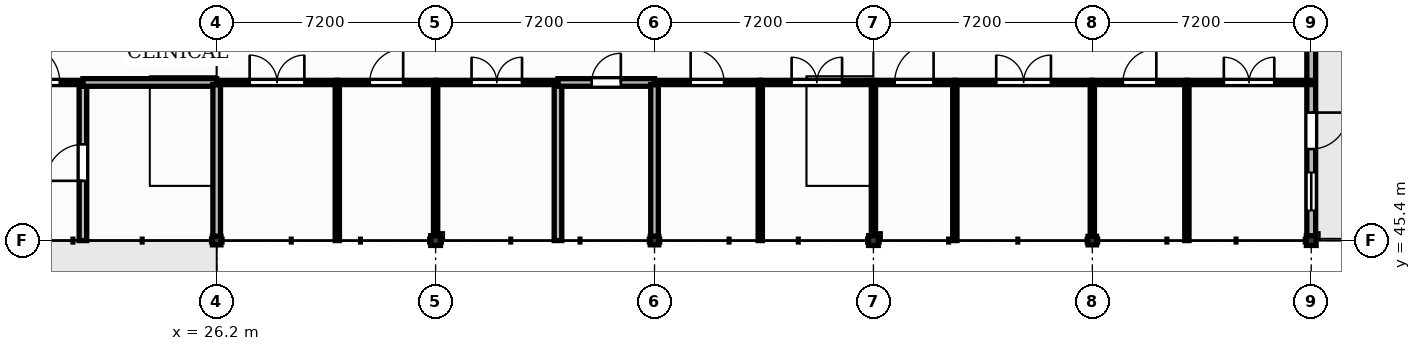
"""IFC4 building model, lengths in metres.
Left out: names, types, materials, properties, quantities, classifications, styles, units other than length and angle.
Written with IfcOpenShell. Run it as: python <this file> out.ifc"""

import sys

from ifc_helpers import new_model, si_unit, direction, frame, frame_2d, origin, origin_2d, place, context, subcontext, project, spatial, rectangle, extrude, element, fill, save


model = new_model("IFC4")
c1 = context("Model", 3, precision=1e-05, world=origin(), true_north=direction((0.0, 1.0)))
c2 = subcontext(c1, "Body", "Model", "MODEL_VIEW")
j1 = project(units=[si_unit("LENGTHUNIT", "METRE"), si_unit("PLANEANGLEUNIT", "RADIAN")], contexts=[c1])
p1 = place(None, origin())
s1 = spatial("IfcSite", under=j1, at=p1, CompositionType="ELEMENT")
p2 = place(p1, origin())
s2 = spatial("IfcBuilding", under=s1, at=p2, CompositionType="ELEMENT")
p3 = place(p2, frame((0.0, 0.0, 13.2)))
s3 = spatial("IfcBuildingStorey", under=s2, at=p3, CompositionType="ELEMENT", Elevation=13.2)
p4 = place(p3, frame((26.2, 45.4, 0.0), z_axis=(0.0, 0.0, 1.0), x_axis=(1.0, 0.0, 0.0)))
e1 = element("IfcColumn", 1, at=p4, inside=s3, PredefinedType="COLUMN", context=c2, shape_type="SweptSolid", body=[
    extrude(rectangle(XDim=0.28, YDim=0.28, at=origin_2d()), origin(), (0.0, 0.0, 1.0), 4.01),
])
p5 = place(p3, frame((33.4, 45.4, 0.0), z_axis=(0.0, 0.0, 1.0), x_axis=(1.0, 0.0, 0.0)))
e2 = element("IfcColumn", 2, at=p5, inside=s3, PredefinedType="COLUMN", context=c2, shape_type="SweptSolid", body=[
    extrude(rectangle(XDim=0.32, YDim=0.32, at=origin_2d()), origin(), (0.0, 0.0, 1.0), 4.01),
])
p6 = place(p3, frame((40.6, 45.4, 0.0), z_axis=(0.0, 0.0, 1.0), x_axis=(1.0, 0.0, 0.0)))
e3 = element("IfcColumn", 3, at=p6, inside=s3, PredefinedType="COLUMN", context=c2, shape_type="SweptSolid", body=[
    extrude(rectangle(XDim=0.28, YDim=0.28, at=origin_2d()), origin(), (0.0, 0.0, 1.0), 4.01),
])
p7 = place(p3, frame((47.8, 45.4, 0.0), z_axis=(0.0, 0.0, 1.0), x_axis=(1.0, 0.0, 0.0)))
e4 = element("IfcColumn", 4, at=p7, inside=s3, PredefinedType="COLUMN", context=c2, shape_type="SweptSolid", body=[
    extrude(rectangle(XDim=0.32, YDim=0.32, at=origin_2d()), origin(), (0.0, 0.0, 1.0), 4.01),
])
p8 = place(p3, frame((55.0, 45.4, 0.0), z_axis=(0.0, 0.0, 1.0), x_axis=(1.0, 0.0, 0.0)))
e5 = element("IfcColumn", 5, at=p8, inside=s3, PredefinedType="COLUMN", context=c2, shape_type="SweptSolid", body=[
    extrude(rectangle(XDim=0.28, YDim=0.28, at=origin_2d()), origin(), (0.0, 0.0, 1.0), 3.98),
])
p9 = place(p3, frame((62.2, 45.4, 0.0), z_axis=(0.0, 0.0, 1.0), x_axis=(1.0, 0.0, 0.0)))
e6 = element("IfcColumn", 6, at=p9, inside=s3, PredefinedType="COLUMN", context=c2, shape_type="SweptSolid", body=[
    extrude(rectangle(XDim=0.32, YDim=0.32, at=origin_2d()), origin(), (0.0, 0.0, 1.0), 3.98),
])
p10 = place(p3, frame((62.2, 45.56, 0.0), z_axis=(0.0, 0.0, 1.0), x_axis=(0.0, 1.0, 0.0)))
e7 = element("IfcWall", 7, at=p10, inside=s3, PredefinedType="SOLIDWALL", context=c2, shape_type="SweptSolid", body=[
    extrude(rectangle(XDim=6.9, YDim=0.29, at=frame_2d((3.45, 0.0))), origin(), (0.0, 0.0, 1.0), 3.52),
])
p11 = place(p10, frame((2.85, 0.0, 0.0)))
e8 = element("IfcOpeningElement", 8, at=p11, cuts=e7, PredefinedType="OPENING", context=c2, shape_type="SweptSolid", body=[
    extrude(rectangle(XDim=1.2, YDim=2.25, at=frame_2d((0.6, 1.125))), frame((0.0, 0.155, 0.0), z_axis=(0.0, -1.0, 0.0), x_axis=(1.0, 0.0, 0.0)), (0.0, 0.0, 1.0), 0.31),
])
p12 = place(p10, frame((0.83, 0.0, 1.35)))
e9 = element("IfcOpeningElement", 9, at=p12, cuts=e7, PredefinedType="OPENING", context=c2, shape_type="SweptSolid", body=[
    extrude(rectangle(XDim=1.25, YDim=1.4, at=frame_2d((0.625, 0.7))), frame((0.0, 0.155, 0.0), z_axis=(0.0, -1.0, 0.0), x_axis=(1.0, 0.0, 0.0)), (0.0, 0.0, 1.0), 0.31),
])
p13 = place(p3, frame((19.0, 50.6, 0.0), z_axis=(0.0, 0.0, 1.0), x_axis=(1.0, 0.0, 0.0)))
e10 = element("IfcWall", 10, at=p13, inside=s3, PredefinedType="PARTITIONING", context=c2, shape_type="SweptSolid", body=[
    extrude(rectangle(XDim=2.8, YDim=0.14, at=frame_2d((1.4, 0.0))), origin(), (0.0, 0.0, 1.0), 3.93),
])
p14 = place(p13, frame((0.76, 0.0, 0.0)))
e11 = element("IfcOpeningElement", 11, at=p14, cuts=e10, PredefinedType="OPENING", context=c2, shape_type="SweptSolid", body=[
    extrude(rectangle(XDim=1.28, YDim=2.2, at=frame_2d((0.64, 1.1))), frame((0.0, 0.08, 0.0), z_axis=(0.0, -1.0, 0.0), x_axis=(1.0, 0.0, 0.0)), (0.0, 0.0, 1.0), 0.16),
])
p15 = place(p3, frame((21.8, 45.4, 0.0), z_axis=(0.0, 0.0, 1.0), x_axis=(0.0, 1.0, 0.0)))
e12 = element("IfcWall", 12, at=p15, inside=s3, PredefinedType="SOLIDWALL", context=c2, shape_type="SweptSolid", body=[
    extrude(rectangle(XDim=5.13, YDim=0.25, at=frame_2d((2.565, 0.0))), origin(), (0.0, 0.0, 1.0), 3.93),
])
p16 = place(p15, frame((1.965, 0.0, 0.0)))
e13 = element("IfcOpeningElement", 13, at=p16, cuts=e12, PredefinedType="OPENING", context=c2, shape_type="SweptSolid", body=[
    extrude(rectangle(XDim=1.2, YDim=2.15, at=frame_2d((0.6, 1.075))), frame((0.0, 0.135, 0.0), z_axis=(0.0, -1.0, 0.0), x_axis=(1.0, 0.0, 0.0)), (0.0, 0.0, 1.0), 0.27),
])
p17 = place(p3, frame((21.8, 50.6, 0.0), z_axis=(0.0, 0.0, 1.0), x_axis=(1.0, 0.0, 0.0)))
e14 = element("IfcWall", 14, at=p17, inside=s3, PredefinedType="SOLIDWALL", context=c2, shape_type="SweptSolid", body=[
    extrude(rectangle(XDim=4.4, YDim=0.25, at=frame_2d((2.2, 0.0))), origin(), (0.0, 0.0, 1.0), 3.96),
])
p18 = place(p3, frame((26.2, 45.54, 0.0), z_axis=(0.0, 0.0, 1.0), x_axis=(0.0, 1.0, 0.0)))
e15 = element("IfcWall", 15, at=p18, inside=s3, PredefinedType="SOLIDWALL", context=c2, shape_type="SweptSolid", body=[
    extrude(rectangle(XDim=4.99, YDim=0.25, at=frame_2d((2.495, 0.0))), origin(), (0.0, 0.0, 1.0), 3.49),
])
p19 = place(p3, frame((26.2, 50.6, 0.0), z_axis=(0.0, 0.0, 1.0), x_axis=(1.0, 0.0, 0.0)))
e16 = element("IfcWall", 16, at=p19, inside=s3, PredefinedType="PARTITIONING", context=c2, shape_type="SweptSolid", body=[
    extrude(rectangle(XDim=3.967, YDim=0.14, at=frame_2d((1.983, 0.0))), origin(), (0.0, 0.0, 1.0), 3.96),
])
p20 = place(p19, frame((1.083, 0.0, 0.0)))
e17 = element("IfcOpeningElement", 17, at=p20, cuts=e16, PredefinedType="OPENING", context=c2, shape_type="SweptSolid", body=[
    extrude(rectangle(XDim=1.8, YDim=2.3, at=frame_2d((0.9, 1.15))), frame((0.0, 0.08, 0.0), z_axis=(0.0, -1.0, 0.0), x_axis=(1.0, 0.0, 0.0)), (0.0, 0.0, 1.0), 0.16),
])
p21 = place(p3, frame((30.167, 45.4, 0.0), z_axis=(0.0, 0.0, 1.0), x_axis=(0.0, 1.0, 0.0)))
e18 = element("IfcWall", 18, at=p21, inside=s3, PredefinedType="PARTITIONING", context=c2, shape_type="SweptSolid", body=[
    extrude(rectangle(XDim=5.13, YDim=0.14, at=frame_2d((2.565, 0.0))), origin(), (0.0, 0.0, 1.0), 3.96),
])
p22 = place(p3, frame((30.167, 50.6, 0.0), z_axis=(0.0, 0.0, 1.0), x_axis=(1.0, 0.0, 0.0)))
e19 = element("IfcWall", 19, at=p22, inside=s3, PredefinedType="PARTITIONING", context=c2, shape_type="SweptSolid", body=[
    extrude(rectangle(XDim=3.233, YDim=0.14, at=frame_2d((1.616, 0.0))), origin(), (0.0, 0.0, 1.0), 3.96),
])
p23 = place(p22, frame((1.066, 0.0, 0.0)))
e20 = element("IfcOpeningElement", 20, at=p23, cuts=e19, PredefinedType="OPENING", context=c2, shape_type="SweptSolid", body=[
    extrude(rectangle(XDim=1.1, YDim=2.1, at=frame_2d((0.55, 1.05))), frame((0.0, 0.08, 0.0), z_axis=(0.0, -1.0, 0.0), x_axis=(1.0, 0.0, 0.0)), (0.0, 0.0, 1.0), 0.16),
])
p24 = place(p3, frame((33.4, 45.56, 0.0), z_axis=(0.0, 0.0, 1.0), x_axis=(0.0, 1.0, 0.0)))
e21 = element("IfcWall", 21, at=p24, inside=s3, PredefinedType="PARTITIONING", context=c2, shape_type="SweptSolid", body=[
    extrude(rectangle(XDim=4.97, YDim=0.14, at=frame_2d((2.485, 0.0))), origin(), (0.0, 0.0, 1.0), 3.49),
])
p25 = place(p3, frame((33.4, 50.6, 0.0), z_axis=(0.0, 0.0, 1.0), x_axis=(1.0, 0.0, 0.0)))
e22 = element("IfcWall", 22, at=p25, inside=s3, PredefinedType="PARTITIONING", context=c2, shape_type="SweptSolid", body=[
    extrude(rectangle(XDim=4.025, YDim=0.14, at=frame_2d((2.013, 0.0))), origin(), (0.0, 0.0, 1.0), 3.96),
])
p26 = place(p25, frame((1.183, 0.0, 0.0)))
e23 = element("IfcOpeningElement", 23, at=p26, cuts=e22, PredefinedType="OPENING", context=c2, shape_type="SweptSolid", body=[
    extrude(rectangle(XDim=1.66, YDim=2.3, at=frame_2d((0.83, 1.15))), frame((0.0, 0.08, 0.0), z_axis=(0.0, -1.0, 0.0), x_axis=(1.0, 0.0, 0.0)), (0.0, 0.0, 1.0), 0.16),
])
p27 = place(p3, frame((37.425, 45.4, 0.0), z_axis=(0.0, 0.0, 1.0), x_axis=(0.0, 1.0, 0.0)))
e24 = element("IfcWall", 24, at=p27, inside=s3, PredefinedType="SOLIDWALL", context=c2, shape_type="SweptSolid", body=[
    extrude(rectangle(XDim=5.13, YDim=0.25, at=frame_2d((2.565, 0.0))), origin(), (0.0, 0.0, 1.0), 3.96),
])
p28 = place(p3, frame((37.425, 50.6, 0.0), z_axis=(0.0, 0.0, 1.0), x_axis=(1.0, 0.0, 0.0)))
e25 = element("IfcWall", 25, at=p28, inside=s3, PredefinedType="SOLIDWALL", context=c2, shape_type="SweptSolid", body=[
    extrude(rectangle(XDim=3.175, YDim=0.25, at=frame_2d((1.587, 0.0))), origin(), (0.0, 0.0, 1.0), 3.96),
])
p29 = place(p28, frame((1.107, 0.0, 0.0)))
e26 = element("IfcOpeningElement", 26, at=p29, cuts=e25, PredefinedType="OPENING", context=c2, shape_type="SweptSolid", body=[
    extrude(rectangle(XDim=0.96, YDim=2.1, at=frame_2d((0.48, 1.05))), frame((0.0, 0.135, 0.0), z_axis=(0.0, -1.0, 0.0), x_axis=(1.0, 0.0, 0.0)), (0.0, 0.0, 1.0), 0.27),
])
p30 = place(p3, frame((40.6, 45.54, 0.0), z_axis=(0.0, 0.0, 1.0), x_axis=(0.0, 1.0, 0.0)))
e27 = element("IfcWall", 27, at=p30, inside=s3, PredefinedType="SOLIDWALL", context=c2, shape_type="SweptSolid", body=[
    extrude(rectangle(XDim=4.99, YDim=0.25, at=frame_2d((2.495, 0.0))), origin(), (0.0, 0.0, 1.0), 3.49),
])
p31 = place(p3, frame((40.6, 50.6, 0.0), z_axis=(0.0, 0.0, 1.0), x_axis=(1.0, 0.0, 0.0)))
e28 = element("IfcWall", 28, at=p31, inside=s3, PredefinedType="PARTITIONING", context=c2, shape_type="SweptSolid", body=[
    extrude(rectangle(XDim=3.478, YDim=0.14, at=frame_2d((1.739, 0.0))), origin(), (0.0, 0.0, 1.0), 3.96),
])
p32 = place(p31, frame((1.189, 0.0, 0.0)))
e29 = element("IfcOpeningElement", 29, at=p32, cuts=e28, PredefinedType="OPENING", context=c2, shape_type="SweptSolid", body=[
    extrude(rectangle(XDim=1.1, YDim=2.1, at=frame_2d((0.55, 1.05))), frame((0.0, 0.08, 0.0), z_axis=(0.0, -1.0, 0.0), x_axis=(1.0, 0.0, 0.0)), (0.0, 0.0, 1.0), 0.16),
])
p33 = place(p3, frame((44.078, 45.4, 0.0), z_axis=(0.0, 0.0, 1.0), x_axis=(0.0, 1.0, 0.0)))
e30 = element("IfcWall", 30, at=p33, inside=s3, PredefinedType="PARTITIONING", context=c2, shape_type="SweptSolid", body=[
    extrude(rectangle(XDim=5.13, YDim=0.14, at=frame_2d((2.565, 0.0))), origin(), (0.0, 0.0, 1.0), 3.96),
])
p34 = place(p3, frame((44.078, 50.6, 0.0), z_axis=(0.0, 0.0, 1.0), x_axis=(1.0, 0.0, 0.0)))
e31 = element("IfcWall", 31, at=p34, inside=s3, PredefinedType="PARTITIONING", context=c2, shape_type="SweptSolid", body=[
    extrude(rectangle(XDim=3.722, YDim=0.14, at=frame_2d((1.861, 0.0))), origin(), (0.0, 0.0, 1.0), 3.96),
])
p35 = place(p34, frame((1.031, 0.0, 0.0)))
e32 = element("IfcOpeningElement", 32, at=p35, cuts=e31, PredefinedType="OPENING", context=c2, shape_type="SweptSolid", body=[
    extrude(rectangle(XDim=1.66, YDim=2.3, at=frame_2d((0.83, 1.15))), frame((0.0, 0.08, 0.0), z_axis=(0.0, -1.0, 0.0), x_axis=(1.0, 0.0, 0.0)), (0.0, 0.0, 1.0), 0.16),
])
p36 = place(p3, frame((47.8, 45.56, 0.0), z_axis=(0.0, 0.0, 1.0), x_axis=(0.0, 1.0, 0.0)))
e33 = element("IfcWall", 33, at=p36, inside=s3, PredefinedType="PARTITIONING", context=c2, shape_type="SweptSolid", body=[
    extrude(rectangle(XDim=4.97, YDim=0.14, at=frame_2d((2.485, 0.0))), origin(), (0.0, 0.0, 1.0), 3.49),
])
p37 = place(p3, frame((47.8, 50.6, 0.0), z_axis=(0.0, 0.0, 1.0), x_axis=(1.0, 0.0, 0.0)))
e34 = element("IfcWall", 34, at=p37, inside=s3, PredefinedType="PARTITIONING", context=c2, shape_type="SweptSolid", body=[
    extrude(rectangle(XDim=2.678, YDim=0.14, at=frame_2d((1.339, 0.0))), origin(), (0.0, 0.0, 1.0), 3.96),
])
p38 = place(p37, frame((0.699, 0.0, 0.0)))
e35 = element("IfcOpeningElement", 35, at=p38, cuts=e34, PredefinedType="OPENING", context=c2, shape_type="SweptSolid", body=[
    extrude(rectangle(XDim=1.28, YDim=2.2, at=frame_2d((0.64, 1.1))), frame((0.0, 0.08, 0.0), z_axis=(0.0, -1.0, 0.0), x_axis=(1.0, 0.0, 0.0)), (0.0, 0.0, 1.0), 0.16),
])
p39 = place(p3, frame((50.478, 45.4, 0.0), z_axis=(0.0, 0.0, 1.0), x_axis=(0.0, 1.0, 0.0)))
e36 = element("IfcWall", 36, at=p39, inside=s3, PredefinedType="PARTITIONING", context=c2, shape_type="SweptSolid", body=[
    extrude(rectangle(XDim=5.13, YDim=0.14, at=frame_2d((2.565, 0.0))), origin(), (0.0, 0.0, 1.0), 3.96),
])
p40 = place(p3, frame((50.478, 50.6, 0.0), z_axis=(0.0, 0.0, 1.0), x_axis=(1.0, 0.0, 0.0)))
e37 = element("IfcWall", 37, at=p40, inside=s3, PredefinedType="PARTITIONING", context=c2, shape_type="SweptSolid", body=[
    extrude(rectangle(XDim=4.522, YDim=0.14, at=frame_2d((2.261, 0.0))), origin(), (0.0, 0.0, 1.0), 3.96),
])
p41 = place(p40, frame((1.361, 0.0, 0.0)))
e38 = element("IfcOpeningElement", 38, at=p41, cuts=e37, PredefinedType="OPENING", context=c2, shape_type="SweptSolid", body=[
    extrude(rectangle(XDim=1.8, YDim=2.3, at=frame_2d((0.9, 1.15))), frame((0.0, 0.08, 0.0), z_axis=(0.0, -1.0, 0.0), x_axis=(1.0, 0.0, 0.0)), (0.0, 0.0, 1.0), 0.16),
])
p42 = place(p3, frame((55.0, 45.54, 0.0), z_axis=(0.0, 0.0, 1.0), x_axis=(0.0, 1.0, 0.0)))
e39 = element("IfcWall", 39, at=p42, inside=s3, PredefinedType="PARTITIONING", context=c2, shape_type="SweptSolid", body=[
    extrude(rectangle(XDim=4.99, YDim=0.14, at=frame_2d((2.495, 0.0))), origin(), (0.0, 0.0, 1.0), 3.52),
])
p43 = place(p3, frame((55.0, 50.6, 0.0), z_axis=(0.0, 0.0, 1.0), x_axis=(1.0, 0.0, 0.0)))
e40 = element("IfcWall", 40, at=p43, inside=s3, PredefinedType="PARTITIONING", context=c2, shape_type="SweptSolid", body=[
    extrude(rectangle(XDim=3.11, YDim=0.14, at=frame_2d((1.555, 0.0))), origin(), (0.0, 0.0, 1.0), 3.96),
])
p44 = place(p43, frame((1.005, 0.0, 0.0)))
e41 = element("IfcOpeningElement", 41, at=p44, cuts=e40, PredefinedType="OPENING", context=c2, shape_type="SweptSolid", body=[
    extrude(rectangle(XDim=1.1, YDim=2.1, at=frame_2d((0.55, 1.05))), frame((0.0, 0.08, 0.0), z_axis=(0.0, -1.0, 0.0), x_axis=(1.0, 0.0, 0.0)), (0.0, 0.0, 1.0), 0.16),
])
p45 = place(p3, frame((58.11, 45.4, 0.0), z_axis=(0.0, 0.0, 1.0), x_axis=(0.0, 1.0, 0.0)))
e42 = element("IfcWall", 42, at=p45, inside=s3, PredefinedType="PARTITIONING", context=c2, shape_type="SweptSolid", body=[
    extrude(rectangle(XDim=5.13, YDim=0.14, at=frame_2d((2.565, 0.0))), origin(), (0.0, 0.0, 1.0), 3.96),
])
p46 = place(p3, frame((58.11, 50.6, 0.0), z_axis=(0.0, 0.0, 1.0), x_axis=(1.0, 0.0, 0.0)))
e43 = element("IfcWall", 43, at=p46, inside=s3, PredefinedType="PARTITIONING", context=c2, shape_type="SweptSolid", body=[
    extrude(rectangle(XDim=4.09, YDim=0.14, at=frame_2d((2.045, 0.0))), origin(), (0.0, 0.0, 1.0), 3.96),
])
p47 = place(p46, frame((1.215, 0.0, 0.0)))
e44 = element("IfcOpeningElement", 44, at=p47, cuts=e43, PredefinedType="OPENING", context=c2, shape_type="SweptSolid", body=[
    extrude(rectangle(XDim=1.66, YDim=2.3, at=frame_2d((0.83, 1.15))), frame((0.0, 0.08, 0.0), z_axis=(0.0, -1.0, 0.0), x_axis=(1.0, 0.0, 0.0)), (0.0, 0.0, 1.0), 0.16),
])
p48 = place(p11, frame((1.2, 0.0, 0.0), z_axis=(0.0, 0.0, 1.0), x_axis=(-1.0, 0.0, 0.0)))
e45 = element("IfcDoor", 45, at=p48, inside=s3, OperationType="SINGLE_SWING_LEFT", PredefinedType="DOOR", context=c2, shape_type="SweptSolid", body=[
    extrude(rectangle(XDim=1.2, YDim=2.25, at=frame_2d((0.6, 1.125))), frame((0.0, 0.025, 0.0), z_axis=(0.0, -1.0, 0.0), x_axis=(1.0, 0.0, 0.0)), (0.0, 0.0, 1.0), 0.05),
])
fill(e8, e45)
p49 = place(p12, origin())
e46 = element("IfcWindow", 46, at=p49, inside=s3, PartitioningType="SINGLE_PANEL", PredefinedType="WINDOW", context=c2, shape_type="SweptSolid", body=[
    extrude(rectangle(XDim=1.25, YDim=1.4, at=frame_2d((0.625, 0.7))), frame((0.0, 0.03, 0.0), z_axis=(0.0, -1.0, 0.0), x_axis=(1.0, 0.0, 0.0)), (0.0, 0.0, 1.0), 0.06),
])
fill(e9, e46)
p50 = place(p14, origin())
e47 = element("IfcDoor", 47, at=p50, inside=s3, OperationType="SINGLE_SWING_LEFT", PredefinedType="DOOR", context=c2, shape_type="SweptSolid", body=[
    extrude(rectangle(XDim=1.28, YDim=2.2, at=frame_2d((0.64, 1.1))), frame((0.0, 0.025, 0.0), z_axis=(0.0, -1.0, 0.0), x_axis=(1.0, 0.0, 0.0)), (0.0, 0.0, 1.0), 0.05),
])
fill(e11, e47)
p51 = place(p16, origin())
e48 = element("IfcDoor", 48, at=p51, inside=s3, OperationType="SINGLE_SWING_LEFT", PredefinedType="DOOR", context=c2, shape_type="SweptSolid", body=[
    extrude(rectangle(XDim=1.2, YDim=2.15, at=frame_2d((0.6, 1.075))), frame((0.0, 0.025, 0.0), z_axis=(0.0, -1.0, 0.0), x_axis=(1.0, 0.0, 0.0)), (0.0, 0.0, 1.0), 0.05),
])
fill(e13, e48)
p52 = place(p20, origin())
e49 = element("IfcDoor", 49, at=p52, inside=s3, OperationType="DOUBLE_DOOR_SINGLE_SWING", PredefinedType="DOOR", context=c2, shape_type="SweptSolid", body=[
    extrude(rectangle(XDim=1.8, YDim=2.3, at=frame_2d((0.9, 1.15))), frame((0.0, 0.025, 0.0), z_axis=(0.0, -1.0, 0.0), x_axis=(1.0, 0.0, 0.0)), (0.0, 0.0, 1.0), 0.05),
])
fill(e17, e49)
p53 = place(p23, origin())
e50 = element("IfcDoor", 50, at=p53, inside=s3, OperationType="SINGLE_SWING_RIGHT", PredefinedType="DOOR", context=c2, shape_type="SweptSolid", body=[
    extrude(rectangle(XDim=1.1, YDim=2.1, at=frame_2d((0.55, 1.05))), frame((0.0, 0.025, 0.0), z_axis=(0.0, -1.0, 0.0), x_axis=(1.0, 0.0, 0.0)), (0.0, 0.0, 1.0), 0.05),
])
fill(e20, e50)
p54 = place(p26, origin())
e51 = element("IfcDoor", 51, at=p54, inside=s3, OperationType="DOUBLE_DOOR_SINGLE_SWING", PredefinedType="DOOR", context=c2, shape_type="SweptSolid", body=[
    extrude(rectangle(XDim=1.66, YDim=2.3, at=frame_2d((0.83, 1.15))), frame((0.0, 0.025, 0.0), z_axis=(0.0, -1.0, 0.0), x_axis=(1.0, 0.0, 0.0)), (0.0, 0.0, 1.0), 0.05),
])
fill(e23, e51)
p55 = place(p29, origin())
e52 = element("IfcDoor", 52, at=p55, inside=s3, OperationType="SINGLE_SWING_RIGHT", PredefinedType="DOOR", context=c2, shape_type="SweptSolid", body=[
    extrude(rectangle(XDim=0.96, YDim=2.1, at=frame_2d((0.48, 1.05))), frame((0.0, 0.025, 0.0), z_axis=(0.0, -1.0, 0.0), x_axis=(1.0, 0.0, 0.0)), (0.0, 0.0, 1.0), 0.05),
])
fill(e26, e52)
p56 = place(p32, origin())
e53 = element("IfcDoor", 53, at=p56, inside=s3, OperationType="SINGLE_SWING_LEFT", PredefinedType="DOOR", context=c2, shape_type="SweptSolid", body=[
    extrude(rectangle(XDim=1.1, YDim=2.1, at=frame_2d((0.55, 1.05))), frame((0.0, 0.025, 0.0), z_axis=(0.0, -1.0, 0.0), x_axis=(1.0, 0.0, 0.0)), (0.0, 0.0, 1.0), 0.05),
])
fill(e29, e53)
p57 = place(p35, origin())
e54 = element("IfcDoor", 54, at=p57, inside=s3, OperationType="DOUBLE_DOOR_SINGLE_SWING", PredefinedType="DOOR", context=c2, shape_type="SweptSolid", body=[
    extrude(rectangle(XDim=1.66, YDim=2.3, at=frame_2d((0.83, 1.15))), frame((0.0, 0.025, 0.0), z_axis=(0.0, -1.0, 0.0), x_axis=(1.0, 0.0, 0.0)), (0.0, 0.0, 1.0), 0.05),
])
fill(e32, e54)
p58 = place(p38, origin())
e55 = element("IfcDoor", 55, at=p58, inside=s3, OperationType="SINGLE_SWING_RIGHT", PredefinedType="DOOR", context=c2, shape_type="SweptSolid", body=[
    extrude(rectangle(XDim=1.28, YDim=2.2, at=frame_2d((0.64, 1.1))), frame((0.0, 0.025, 0.0), z_axis=(0.0, -1.0, 0.0), x_axis=(1.0, 0.0, 0.0)), (0.0, 0.0, 1.0), 0.05),
])
fill(e35, e55)
p59 = place(p41, origin())
e56 = element("IfcDoor", 56, at=p59, inside=s3, OperationType="DOUBLE_DOOR_SINGLE_SWING", PredefinedType="DOOR", context=c2, shape_type="SweptSolid", body=[
    extrude(rectangle(XDim=1.8, YDim=2.3, at=frame_2d((0.9, 1.15))), frame((0.0, 0.025, 0.0), z_axis=(0.0, -1.0, 0.0), x_axis=(1.0, 0.0, 0.0)), (0.0, 0.0, 1.0), 0.05),
])
fill(e38, e56)
p60 = place(p44, origin())
e57 = element("IfcDoor", 57, at=p60, inside=s3, OperationType="SINGLE_SWING_RIGHT", PredefinedType="DOOR", context=c2, shape_type="SweptSolid", body=[
    extrude(rectangle(XDim=1.1, YDim=2.1, at=frame_2d((0.55, 1.05))), frame((0.0, 0.025, 0.0), z_axis=(0.0, -1.0, 0.0), x_axis=(1.0, 0.0, 0.0)), (0.0, 0.0, 1.0), 0.05),
])
fill(e41, e57)
p61 = place(p47, origin())
e58 = element("IfcDoor", 58, at=p61, inside=s3, OperationType="DOUBLE_DOOR_SINGLE_SWING", PredefinedType="DOOR", context=c2, shape_type="SweptSolid", body=[
    extrude(rectangle(XDim=1.66, YDim=2.3, at=frame_2d((0.83, 1.15))), frame((0.0, 0.025, 0.0), z_axis=(0.0, -1.0, 0.0), x_axis=(1.0, 0.0, 0.0)), (0.0, 0.0, 1.0), 0.05),
])
fill(e44, e58)
save(model, sys.argv[1])
